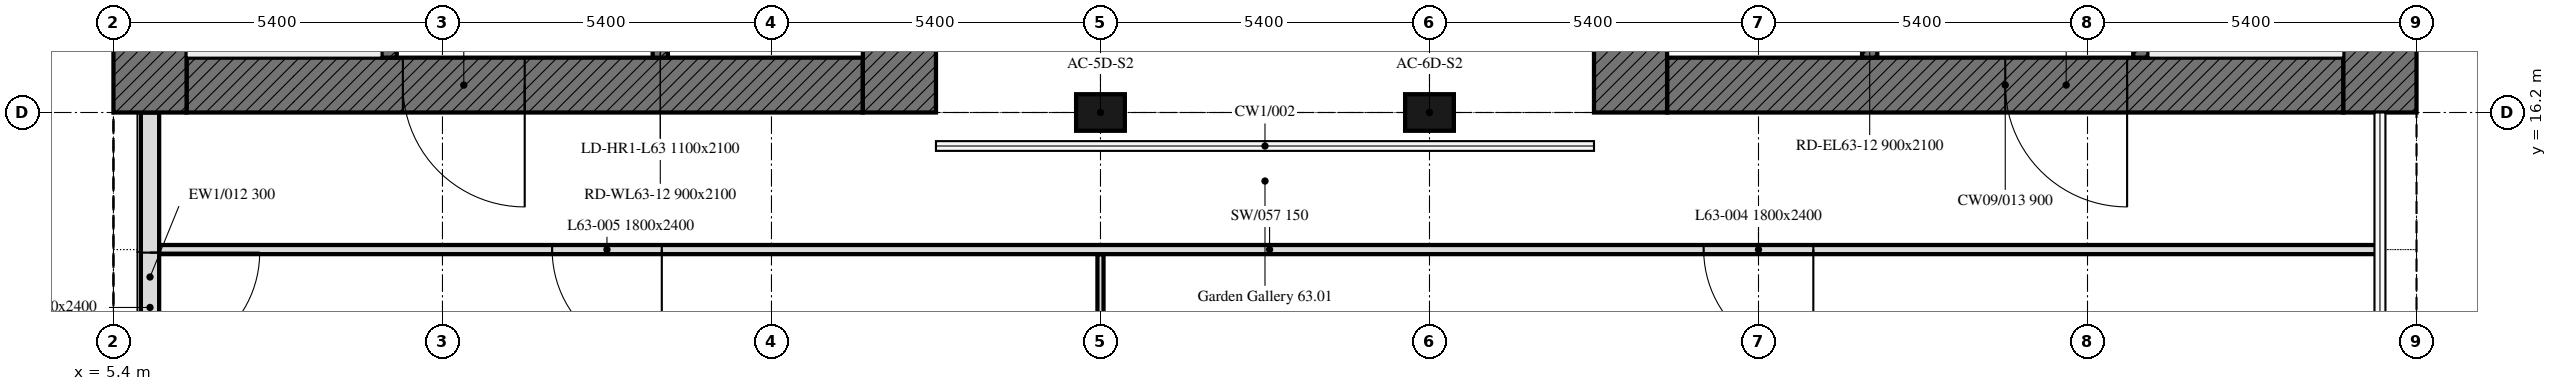
"""IFC4 building model, lengths in metres.
Left out: names, types, materials, properties, quantities, classifications, styles, units other than length and angle.
Written with IfcOpenShell. Run it as: python <this file> out.ifc"""

import sys

from ifc_helpers import new_model, si_unit, direction, frame, frame_2d, origin, origin_2d, place, context, subcontext, project, spatial, rectangle, extrude, element, fill, save


model = new_model("IFC4")
c1 = context("Model", 3, precision=1e-05, world=origin(), true_north=direction((0.0, 1.0)))
c2 = subcontext(c1, "Body", "Model", "MODEL_VIEW")
j1 = project(units=[si_unit("LENGTHUNIT", "METRE"), si_unit("PLANEANGLEUNIT", "RADIAN")], contexts=[c1])
p1 = place(None, origin())
s1 = spatial("IfcSite", under=j1, at=p1, CompositionType="ELEMENT")
p2 = place(p1, origin())
s2 = spatial("IfcBuilding", under=s1, at=p2, CompositionType="ELEMENT")
p3 = place(p2, frame((0.0, 0.0, 260.5)))
s3 = spatial("IfcBuildingStorey", under=s2, at=p3, CompositionType="ELEMENT", Elevation=260.5)
for number, where, z_axis, x_axis in (
    (1, (21.6, 16.2, 0.0), (0.0, 0.0, 1.0), (1.0, 0.0, 0.0)),
    (2, (27.0, 16.2, 0.0), (0.0, 0.0, 1.0), (1.0, 0.0, 0.0)),
):
    element("IfcColumn", number, at=place(p3, frame(where, z_axis=z_axis, x_axis=x_axis)), inside=s3, PredefinedType="COLUMN", context=c2, shape_type="SweptSolid", body=[
        extrude(rectangle(XDim=0.8, YDim=0.6, at=origin_2d()), origin(), (0.0, 0.0, 1.0), 4.5),
    ])
p4 = place(p3, frame((6.0, 16.2, 0.0), z_axis=(0.0, 0.0, 1.0), x_axis=(0.0, -1.0, 0.0)))
e3 = element("IfcWall", 3, at=p4, inside=s3, PredefinedType="SOLIDWALL", context=c2, shape_type="SweptSolid", body=[
    extrude(rectangle(XDim=5.4, YDim=0.3, at=frame_2d((2.7, 0.0))), origin(), (0.0, 0.0, 1.0), 4.5),
])
p5 = place(p4, frame((2.3, 0.0, 0.0)))
e4 = element("IfcOpeningElement", 4, at=p5, cuts=e3, PredefinedType="OPENING", context=c2, shape_type="SweptSolid", body=[
    extrude(rectangle(XDim=1.8, YDim=2.4, at=frame_2d((0.9, 1.2))), frame((0.0, 0.16, 0.0), z_axis=(0.0, -1.0, 0.0), x_axis=(1.0, 0.0, 0.0)), (0.0, 0.0, 1.0), 0.32),
])
p6 = place(p3, frame((17.7, 16.65, 0.0), z_axis=(0.0, 0.0, 1.0), x_axis=(-1.0, 0.0, 0.0)))
e5 = element("IfcWall", 5, at=p6, inside=s3, PredefinedType="SOLIDWALL", context=c2, shape_type="SweptSolid", body=[
    extrude(rectangle(XDim=11.1, YDim=0.9, at=frame_2d((5.55, 0.0))), origin(), (0.0, 0.0, 1.0), 4.5),
])
p7 = place(p6, frame((5.55, 0.0, 0.0)))
e6 = element("IfcOpeningElement", 6, at=p7, cuts=e5, PredefinedType="OPENING", context=c2, shape_type="SweptSolid", body=[
    extrude(rectangle(XDim=2.0, YDim=2.4, at=frame_2d((1.0, 1.2))), frame((0.0, 0.45, 0.0), z_axis=(0.0, -1.0, 0.0), x_axis=(1.0, 0.0, 0.0)), (0.0, 0.0, 1.0), 0.9),
])
for number, where, z_axis, x_axis in (
    (7, (6.0, 16.2, 0.0), (0.0, 0.0, 1.0), (0.0, 1.0, 0.0)),
    (8, (18.3, 32.4, 0.0), (0.0, 0.0, 1.0), (0.0, -1.0, 0.0)),
):
    element("IfcWall", number, at=place(p3, frame(where, z_axis=z_axis, x_axis=x_axis)), inside=s3, PredefinedType="SOLIDWALL", context=c2, shape_type="SweptSolid", body=[
        extrude(rectangle(XDim=16.2, YDim=1.2, at=frame_2d((8.1, 0.0))), origin(), (0.0, 0.0, 1.0), 4.5),
    ])
p8 = place(p3, frame((9.925, 17.1, 0.0), z_axis=(0.0, 0.0, 1.0), x_axis=(0.0, 1.0, 0.0)))
e9 = element("IfcWall", 9, at=p8, inside=s3, PredefinedType="SOLIDWALL", context=c2, shape_type="SweptSolid", body=[
    extrude(rectangle(XDim=14.4, YDim=0.25, at=frame_2d((7.2, 0.0))), origin(), (0.0, 0.0, 1.0), 4.5),
])
p9 = place(p8, frame((4.6, 0.0, 0.0)))
e10 = element("IfcOpeningElement", 10, at=p9, cuts=e9, PredefinedType="OPENING", context=c2, shape_type="SweptSolid", body=[
    extrude(rectangle(XDim=1.0, YDim=2.1, at=frame_2d((0.5, 1.05))), frame((0.0, 0.125, 0.0), z_axis=(0.0, -1.0, 0.0), x_axis=(1.0, 0.0, 0.0)), (0.0, 0.0, 1.0), 0.25),
])
p10 = place(p8, frame((7.062, 0.0, 0.0)))
e11 = element("IfcOpeningElement", 11, at=p10, cuts=e9, PredefinedType="OPENING", context=c2, shape_type="SweptSolid", body=[
    extrude(rectangle(XDim=1.2, YDim=2.1, at=frame_2d((0.6, 1.05))), frame((0.0, 0.125, 0.0), z_axis=(0.0, -1.0, 0.0), x_axis=(1.0, 0.0, 0.0)), (0.0, 0.0, 1.0), 0.25),
])
p11 = place(p8, frame((9.726, 0.0, 0.0)))
e12 = element("IfcOpeningElement", 12, at=p11, cuts=e9, PredefinedType="OPENING", context=c2, shape_type="SweptSolid", body=[
    extrude(rectangle(XDim=0.9, YDim=2.1, at=frame_2d((0.45, 1.05))), frame((0.0, 0.125, 0.0), z_axis=(0.0, -1.0, 0.0), x_axis=(1.0, 0.0, 0.0)), (0.0, 0.0, 1.0), 0.25),
])
p12 = place(p8, frame((11.539, 0.0, 0.0)))
e13 = element("IfcOpeningElement", 13, at=p12, cuts=e9, PredefinedType="OPENING", context=c2, shape_type="SweptSolid", body=[
    extrude(rectangle(XDim=0.9, YDim=2.1, at=frame_2d((0.45, 1.05))), frame((0.0, 0.125, 0.0), z_axis=(0.0, -1.0, 0.0), x_axis=(1.0, 0.0, 0.0)), (0.0, 0.0, 1.0), 0.25),
])
p13 = place(p8, frame((13.226, 0.0, 0.0)))
e14 = element("IfcOpeningElement", 14, at=p13, cuts=e9, PredefinedType="OPENING", context=c2, shape_type="SweptSolid", body=[
    extrude(rectangle(XDim=0.9, YDim=2.1, at=frame_2d((0.45, 1.05))), frame((0.0, 0.125, 0.0), z_axis=(0.0, -1.0, 0.0), x_axis=(1.0, 0.0, 0.0)), (0.0, 0.0, 1.0), 0.25),
])
p14 = place(p3, frame((14.375, 17.1, 0.0), z_axis=(0.0, 0.0, 1.0), x_axis=(0.0, 1.0, 0.0)))
e15 = element("IfcWall", 15, at=p14, inside=s3, PredefinedType="SOLIDWALL", context=c2, shape_type="SweptSolid", body=[
    extrude(rectangle(XDim=14.4, YDim=0.25, at=frame_2d((7.2, 0.0))), origin(), (0.0, 0.0, 1.0), 4.5),
])
p15 = place(p14, frame((13.15, 0.0, 0.0)))
e16 = element("IfcOpeningElement", 16, at=p15, cuts=e15, PredefinedType="OPENING", context=c2, shape_type="SweptSolid", body=[
    extrude(rectangle(XDim=1.0, YDim=2.1, at=frame_2d((0.5, 1.05))), frame((0.0, 0.125, 0.0), z_axis=(0.0, -1.0, 0.0), x_axis=(1.0, 0.0, 0.0)), (0.0, 0.0, 1.0), 0.25),
])
p16 = place(p14, frame((3.15, 0.0, 0.0)))
e17 = element("IfcOpeningElement", 17, at=p16, cuts=e15, PredefinedType="OPENING", context=c2, shape_type="SweptSolid", body=[
    extrude(rectangle(XDim=1.1, YDim=2.1, at=frame_2d((0.55, 1.05))), frame((0.0, 0.125, 0.0), z_axis=(0.0, -1.0, 0.0), x_axis=(1.0, 0.0, 0.0)), (0.0, 0.0, 1.0), 0.25),
])
p17 = place(p14, frame((0.7, 0.0, 0.0)))
e18 = element("IfcOpeningElement", 18, at=p17, cuts=e15, PredefinedType="OPENING", context=c2, shape_type="SweptSolid", body=[
    extrude(rectangle(XDim=0.9, YDim=2.1, at=frame_2d((0.45, 1.05))), frame((0.0, 0.125, 0.0), z_axis=(0.0, -1.0, 0.0), x_axis=(1.0, 0.0, 0.0)), (0.0, 0.0, 1.0), 0.25),
])
p18 = place(p14, frame((6.175, 0.0, 0.0)))
e19 = element("IfcOpeningElement", 19, at=p18, cuts=e15, PredefinedType="OPENING", context=c2, shape_type="SweptSolid", body=[
    extrude(rectangle(XDim=0.9, YDim=2.1, at=frame_2d((0.45, 1.05))), frame((0.0, 0.125, 0.0), z_axis=(0.0, -1.0, 0.0), x_axis=(1.0, 0.0, 0.0)), (0.0, 0.0, 1.0), 0.25),
])
p19 = place(p3, frame((42.0, 16.65, 0.0), z_axis=(0.0, 0.0, 1.0), x_axis=(-1.0, 0.0, 0.0)))
e20 = element("IfcWall", 20, at=p19, inside=s3, PredefinedType="SOLIDWALL", context=c2, shape_type="SweptSolid", body=[
    extrude(rectangle(XDim=11.1, YDim=0.9, at=frame_2d((5.55, 0.0))), origin(), (0.0, 0.0, 1.0), 4.5),
])
p20 = place(p19, frame((3.55, 0.0, 0.0)))
e21 = element("IfcOpeningElement", 21, at=p20, cuts=e20, PredefinedType="OPENING", context=c2, shape_type="SweptSolid", body=[
    extrude(rectangle(XDim=2.0, YDim=2.4, at=frame_2d((1.0, 1.2))), frame((0.0, 0.45, 0.0), z_axis=(0.0, -1.0, 0.0), x_axis=(1.0, 0.0, 0.0)), (0.0, 0.0, 1.0), 0.9),
])
for number, where, z_axis, x_axis in (
    (22, (42.6, 32.4, 0.0), (0.0, 0.0, 1.0), (0.0, -1.0, 0.0)),
    (23, (30.3, 16.2, 0.0), (0.0, 0.0, 1.0), (0.0, 1.0, 0.0)),
):
    element("IfcWall", number, at=place(p3, frame(where, z_axis=z_axis, x_axis=x_axis)), inside=s3, PredefinedType="SOLIDWALL", context=c2, shape_type="SweptSolid", body=[
        extrude(rectangle(XDim=16.2, YDim=1.2, at=frame_2d((8.1, 0.0))), origin(), (0.0, 0.0, 1.0), 4.5),
    ])
p21 = place(p3, frame((38.675, 17.1, 0.0), z_axis=(0.0, 0.0, 1.0), x_axis=(0.0, 1.0, 0.0)))
e24 = element("IfcWall", 24, at=p21, inside=s3, PredefinedType="SOLIDWALL", context=c2, shape_type="SweptSolid", body=[
    extrude(rectangle(XDim=14.4, YDim=0.25, at=frame_2d((7.2, 0.0))), origin(), (0.0, 0.0, 1.0), 4.5),
])
p22 = place(p21, frame((4.6, 0.0, 0.0)))
e25 = element("IfcOpeningElement", 25, at=p22, cuts=e24, PredefinedType="OPENING", context=c2, shape_type="SweptSolid", body=[
    extrude(rectangle(XDim=1.0, YDim=2.1, at=frame_2d((0.5, 1.05))), frame((0.0, 0.125, 0.0), z_axis=(0.0, -1.0, 0.0), x_axis=(1.0, 0.0, 0.0)), (0.0, 0.0, 1.0), 0.25),
])
p23 = place(p21, frame((7.062, 0.0, 0.0)))
e26 = element("IfcOpeningElement", 26, at=p23, cuts=e24, PredefinedType="OPENING", context=c2, shape_type="SweptSolid", body=[
    extrude(rectangle(XDim=1.2, YDim=2.1, at=frame_2d((0.6, 1.05))), frame((0.0, 0.125, 0.0), z_axis=(0.0, -1.0, 0.0), x_axis=(1.0, 0.0, 0.0)), (0.0, 0.0, 1.0), 0.25),
])
p24 = place(p21, frame((10.106, 0.0, 0.0)))
e27 = element("IfcOpeningElement", 27, at=p24, cuts=e24, PredefinedType="OPENING", context=c2, shape_type="SweptSolid", body=[
    extrude(rectangle(XDim=0.9, YDim=2.1, at=frame_2d((0.45, 1.05))), frame((0.0, 0.125, 0.0), z_axis=(0.0, -1.0, 0.0), x_axis=(1.0, 0.0, 0.0)), (0.0, 0.0, 1.0), 0.25),
])
p25 = place(p21, frame((12.048, 0.0, 0.0)))
e28 = element("IfcOpeningElement", 28, at=p25, cuts=e24, PredefinedType="OPENING", context=c2, shape_type="SweptSolid", body=[
    extrude(rectangle(XDim=0.9, YDim=2.1, at=frame_2d((0.45, 1.05))), frame((0.0, 0.125, 0.0), z_axis=(0.0, -1.0, 0.0), x_axis=(1.0, 0.0, 0.0)), (0.0, 0.0, 1.0), 0.25),
])
p26 = place(p21, frame((13.354, 0.0, 0.0)))
e29 = element("IfcOpeningElement", 29, at=p26, cuts=e24, PredefinedType="OPENING", context=c2, shape_type="SweptSolid", body=[
    extrude(rectangle(XDim=0.9, YDim=2.1, at=frame_2d((0.45, 1.05))), frame((0.0, 0.125, 0.0), z_axis=(0.0, -1.0, 0.0), x_axis=(1.0, 0.0, 0.0)), (0.0, 0.0, 1.0), 0.25),
])
p27 = place(p3, frame((34.225, 17.1, 0.0), z_axis=(0.0, 0.0, 1.0), x_axis=(0.0, 1.0, 0.0)))
e30 = element("IfcWall", 30, at=p27, inside=s3, PredefinedType="SOLIDWALL", context=c2, shape_type="SweptSolid", body=[
    extrude(rectangle(XDim=14.4, YDim=0.25, at=frame_2d((7.2, 0.0))), origin(), (0.0, 0.0, 1.0), 4.5),
])
p28 = place(p27, frame((13.15, 0.0, 0.0)))
e31 = element("IfcOpeningElement", 31, at=p28, cuts=e30, PredefinedType="OPENING", context=c2, shape_type="SweptSolid", body=[
    extrude(rectangle(XDim=1.0, YDim=2.1, at=frame_2d((0.5, 1.05))), frame((0.0, 0.125, 0.0), z_axis=(0.0, -1.0, 0.0), x_axis=(1.0, 0.0, 0.0)), (0.0, 0.0, 1.0), 0.25),
])
p29 = place(p27, frame((3.15, 0.0, 0.0)))
e32 = element("IfcOpeningElement", 32, at=p29, cuts=e30, PredefinedType="OPENING", context=c2, shape_type="SweptSolid", body=[
    extrude(rectangle(XDim=1.1, YDim=2.1, at=frame_2d((0.55, 1.05))), frame((0.0, 0.125, 0.0), z_axis=(0.0, -1.0, 0.0), x_axis=(1.0, 0.0, 0.0)), (0.0, 0.0, 1.0), 0.25),
])
p30 = place(p27, frame((0.7, 0.0, 0.0)))
e33 = element("IfcOpeningElement", 33, at=p30, cuts=e30, PredefinedType="OPENING", context=c2, shape_type="SweptSolid", body=[
    extrude(rectangle(XDim=0.9, YDim=2.1, at=frame_2d((0.45, 1.05))), frame((0.0, 0.125, 0.0), z_axis=(0.0, -1.0, 0.0), x_axis=(1.0, 0.0, 0.0)), (0.0, 0.0, 1.0), 0.25),
])
p31 = place(p27, frame((6.175, 0.0, 0.0)))
e34 = element("IfcOpeningElement", 34, at=p31, cuts=e30, PredefinedType="OPENING", context=c2, shape_type="SweptSolid", body=[
    extrude(rectangle(XDim=0.9, YDim=2.1, at=frame_2d((0.45, 1.05))), frame((0.0, 0.125, 0.0), z_axis=(0.0, -1.0, 0.0), x_axis=(1.0, 0.0, 0.0)), (0.0, 0.0, 1.0), 0.25),
])
p32 = place(p3, frame((21.6, 13.875, 0.0), z_axis=(0.0, 0.0, 1.0), x_axis=(0.0, -1.0, 0.0)))
e35 = element("IfcWall", 35, at=p32, inside=s3, PredefinedType="PARTITIONING", context=c2, shape_type="SweptSolid", body=[
    extrude(rectangle(XDim=2.705, YDim=0.1, at=frame_2d((1.353, 0.0))), origin(), (0.0, 0.0, 1.0), 3.75),
])
p33 = place(p3, frame((42.6, 13.95, 0.0), z_axis=(0.0, 0.0, 1.0), x_axis=(-1.0, 0.0, 0.0)))
e36 = element("IfcWall", 36, at=p33, inside=s3, PredefinedType="PARTITIONING", context=c2, shape_type="SweptSolid", body=[
    extrude(rectangle(XDim=36.449, YDim=0.15, at=frame_2d((18.225, 0.0))), origin(), (0.0, 0.0, 1.0), 3.75),
])
p34 = place(p33, frame((9.3, 0.0, 0.0)))
e37 = element("IfcOpeningElement", 37, at=p34, cuts=e36, PredefinedType="OPENING", context=c2, shape_type="SweptSolid", body=[
    extrude(rectangle(XDim=1.8, YDim=2.4, at=frame_2d((0.9, 1.2))), frame((0.0, 0.075, 0.0), z_axis=(0.0, -1.0, 0.0), x_axis=(1.0, 0.0, 0.0)), (0.0, 0.0, 1.0), 0.15),
])
p35 = place(p33, frame((28.2, 0.0, 0.0)))
e38 = element("IfcOpeningElement", 38, at=p35, cuts=e36, PredefinedType="OPENING", context=c2, shape_type="SweptSolid", body=[
    extrude(rectangle(XDim=1.8, YDim=2.4, at=frame_2d((0.9, 1.2))), frame((0.0, 0.075, 0.0), z_axis=(0.0, -1.0, 0.0), x_axis=(1.0, 0.0, 0.0)), (0.0, 0.0, 1.0), 0.15),
])
p36 = place(p5, origin())
e39 = element("IfcDoor", 39, at=p36, inside=s3, OperationType="DOUBLE_DOOR_DOUBLE_SWING", PredefinedType="DOOR", context=c2, shape_type="SweptSolid", body=[
    extrude(rectangle(XDim=1.8, YDim=2.4, at=frame_2d((0.9, 1.2))), frame((0.0, 0.025, 0.0), z_axis=(0.0, -1.0, 0.0), x_axis=(1.0, 0.0, 0.0)), (0.0, 0.0, 1.0), 0.05),
])
fill(e4, e39)
p37 = place(p7, origin())
e40 = element("IfcDoor", 40, at=p37, inside=s3, OperationType="DOUBLE_DOOR_SINGLE_SWING", PredefinedType="DOOR", context=c2, shape_type="SweptSolid", body=[
    extrude(rectangle(XDim=2.0, YDim=2.4, at=frame_2d((1.0, 1.2))), frame((0.0, 0.025, 0.0), z_axis=(0.0, -1.0, 0.0), x_axis=(1.0, 0.0, 0.0)), (0.0, 0.0, 1.0), 0.05),
])
fill(e6, e40)
p38 = place(p20, origin())
e41 = element("IfcDoor", 41, at=p38, inside=s3, OperationType="DOUBLE_DOOR_SINGLE_SWING", PredefinedType="DOOR", context=c2, shape_type="SweptSolid", body=[
    extrude(rectangle(XDim=2.0, YDim=2.4, at=frame_2d((1.0, 1.2))), frame((0.0, 0.025, 0.0), z_axis=(0.0, -1.0, 0.0), x_axis=(1.0, 0.0, 0.0)), (0.0, 0.0, 1.0), 0.05),
])
fill(e21, e41)
p39 = place(p34, origin())
e42 = element("IfcDoor", 42, at=p39, inside=s3, OperationType="DOUBLE_DOOR_SINGLE_SWING", PredefinedType="DOOR", context=c2, shape_type="SweptSolid", body=[
    extrude(rectangle(XDim=1.8, YDim=2.4, at=frame_2d((0.9, 1.2))), frame((0.0, 0.025, 0.0), z_axis=(0.0, -1.0, 0.0), x_axis=(1.0, 0.0, 0.0)), (0.0, 0.0, 1.0), 0.05),
])
fill(e37, e42)
p40 = place(p35, origin())
e43 = element("IfcDoor", 43, at=p40, inside=s3, OperationType="DOUBLE_DOOR_SINGLE_SWING", PredefinedType="DOOR", context=c2, shape_type="SweptSolid", body=[
    extrude(rectangle(XDim=1.8, YDim=2.4, at=frame_2d((0.9, 1.2))), frame((0.0, 0.025, 0.0), z_axis=(0.0, -1.0, 0.0), x_axis=(1.0, 0.0, 0.0)), (0.0, 0.0, 1.0), 0.05),
])
fill(e38, e43)
save(model, sys.argv[1])
